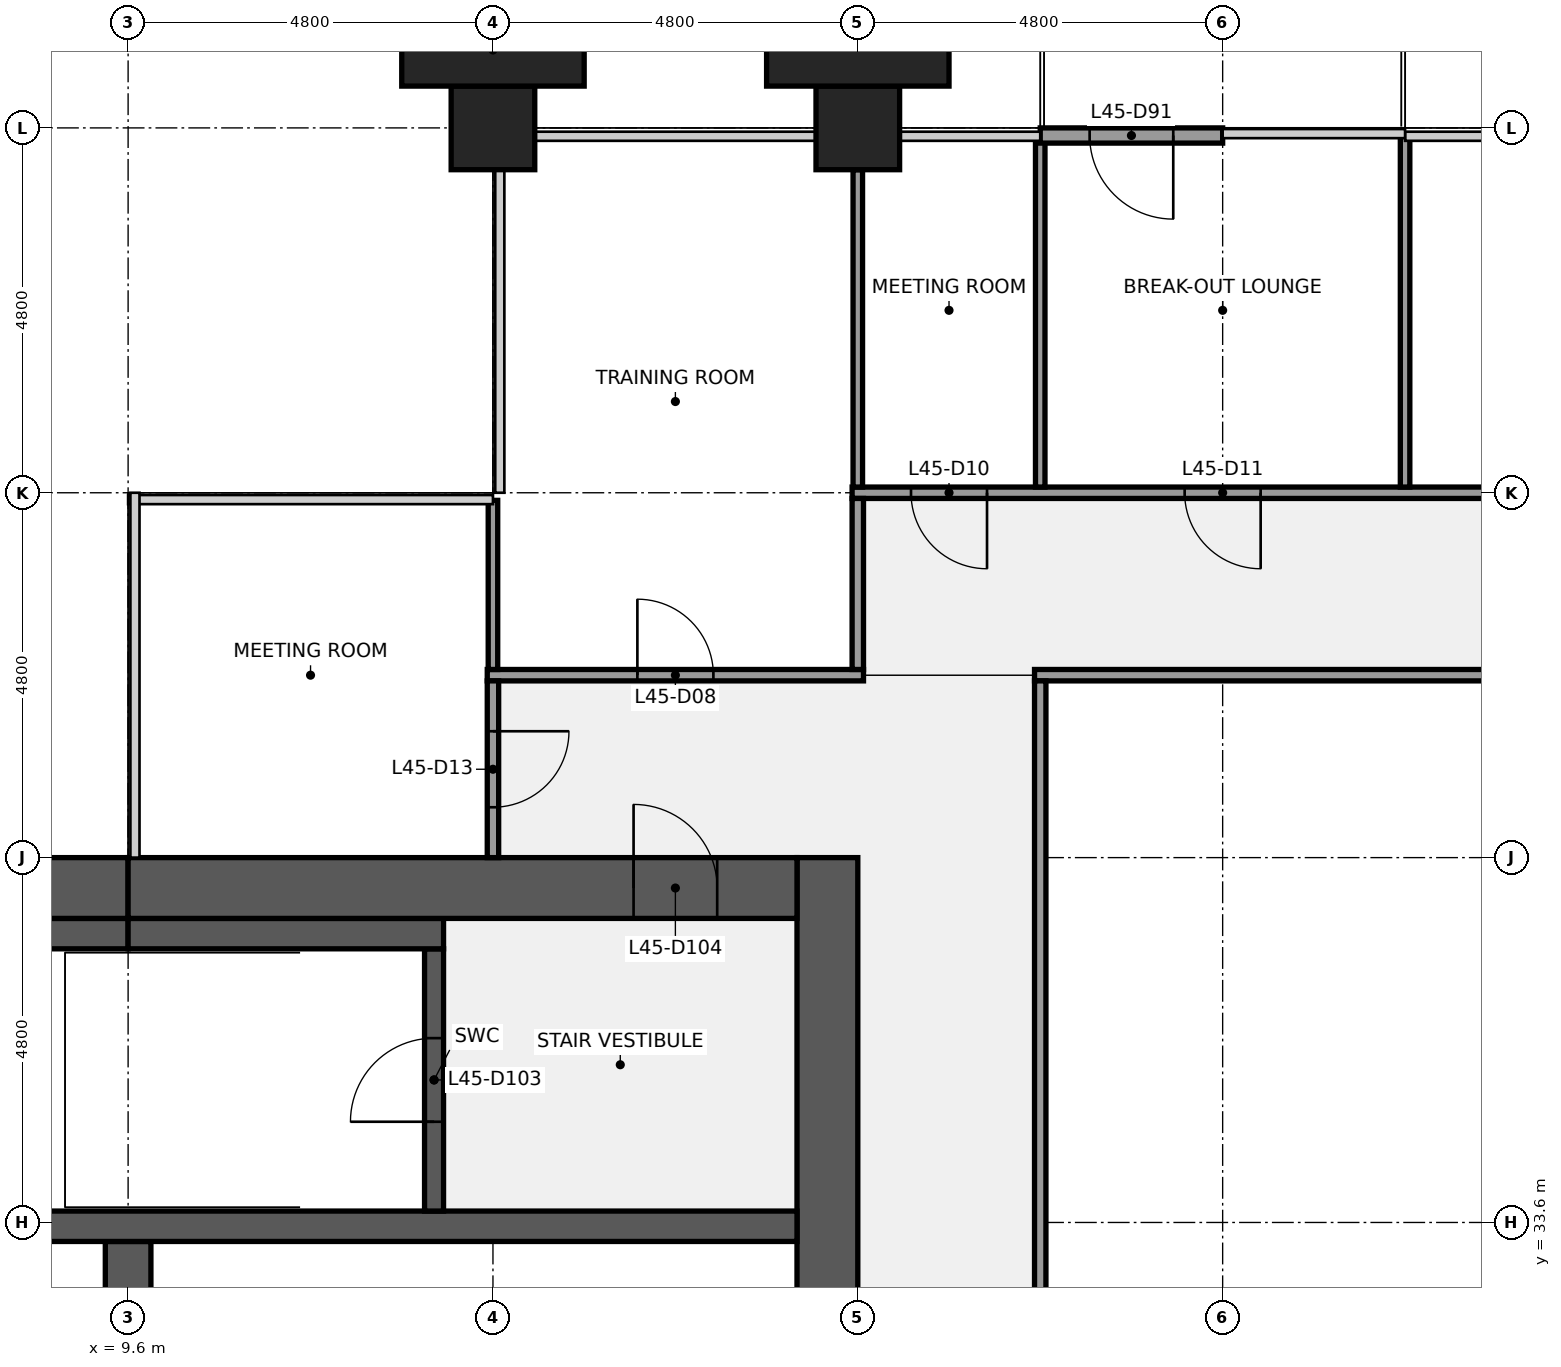
"""IFC4 building model, lengths in metres.
Left out: names, types, materials, properties, quantities, classifications, styles, units other than length and angle.
Written with IfcOpenShell. Run it as: python <this file> out.ifc"""

import sys

from ifc_helpers import new_model, si_unit, direction, frame, frame_2d, origin, origin_2d, place, context, subcontext, project, spatial, rectangle, extrude, element, fill, save


model = new_model("IFC4")
c1 = context("Model", 3, precision=1e-05, world=origin(), true_north=direction((0.0, 1.0)))
c2 = subcontext(c1, "Body", "Model", "MODEL_VIEW")
j1 = project(units=[si_unit("LENGTHUNIT", "METRE"), si_unit("PLANEANGLEUNIT", "RADIAN")], contexts=[c1])
p1 = place(None, origin())
s1 = spatial("IfcSite", under=j1, at=p1, CompositionType="ELEMENT")
p2 = place(p1, origin())
s2 = spatial("IfcBuilding", under=s1, at=p2, CompositionType="ELEMENT")
p3 = place(p2, frame((0.0, 0.0, 209.2)))
s3 = spatial("IfcBuildingStorey", under=s2, at=p3, CompositionType="ELEMENT", Elevation=209.2)
for number, where, z_axis, x_axis in (
    (1, (14.4, 48.0, 0.0), (0.0, 0.0, 1.0), (1.0, 0.0, 0.0)),
    (2, (19.2, 48.0, 0.0), (0.0, 0.0, 1.0), (1.0, 0.0, 0.0)),
):
    element("IfcColumn", number, at=place(p3, frame(where, z_axis=z_axis, x_axis=x_axis)), inside=s3, PredefinedType="COLUMN", context=c2, shape_type="SweptSolid", body=[
        extrude(rectangle(XDim=1.1, YDim=1.1, at=origin_2d()), origin(), (0.0, 0.0, 1.0), 4.0),
    ])
p4 = place(p3, frame((18.8, 38.4, 0.0), z_axis=(0.0, 0.0, 1.0), x_axis=(0.0, -1.0, 0.0)))
e3 = element("IfcWall", 3, at=p4, inside=s3, PredefinedType="SHEAR", context=c2, shape_type="SweptSolid", body=[
    extrude(rectangle(XDim=28.8, YDim=0.8, at=frame_2d((14.4, 0.0))), origin(), (0.0, 0.0, 1.0), 3.84),
])
p5 = place(p4, frame((18.3, 0.0, 0.0)))
e4 = element("IfcOpeningElement", 4, at=p5, cuts=e3, PredefinedType="OPENING", context=c2, shape_type="SweptSolid", body=[
    extrude(rectangle(XDim=1.8, YDim=2.1, at=frame_2d((0.9, 1.05))), frame((0.0, 0.41, 0.0), z_axis=(0.0, -1.0, 0.0), x_axis=(1.0, 0.0, 0.0)), (0.0, 0.0, 1.0), 0.82),
])
p6 = place(p4, frame((8.7, 0.0, 0.0)))
e5 = element("IfcOpeningElement", 5, at=p6, cuts=e3, PredefinedType="OPENING", context=c2, shape_type="SweptSolid", body=[
    extrude(rectangle(XDim=1.8, YDim=2.1, at=frame_2d((0.9, 1.05))), frame((0.0, 0.41, 0.0), z_axis=(0.0, -1.0, 0.0), x_axis=(1.0, 0.0, 0.0)), (0.0, 0.0, 1.0), 0.82),
])
p7 = place(p3, frame((9.6, 30.75, 0.0), z_axis=(0.0, 0.0, 1.0), x_axis=(0.0, 1.0, 0.0)))
e6 = element("IfcWall", 6, at=p7, inside=s3, PredefinedType="SHEAR", context=c2, shape_type="SweptSolid", body=[
    extrude(rectangle(XDim=2.6, YDim=0.6, at=frame_2d((1.3, 0.0))), origin(), (0.0, 0.0, 1.0), 3.84),
])
p8 = place(p3, frame((0.8, 33.55, 0.0), z_axis=(0.0, 0.0, 1.0), x_axis=(1.0, 0.0, 0.0)))
e7 = element("IfcWall", 7, at=p8, inside=s3, PredefinedType="SHEAR", context=c2, shape_type="SweptSolid", body=[
    extrude(rectangle(XDim=17.6, YDim=0.4, at=frame_2d((8.8, 0.0))), origin(), (0.0, 0.0, 1.0), 3.84),
])
p9 = place(p3, frame((13.625, 33.75, 0.0), z_axis=(0.0, 0.0, 1.0), x_axis=(0.0, 1.0, 0.0)))
e8 = element("IfcWall", 8, at=p9, inside=s3, PredefinedType="SHEAR", context=c2, shape_type="SweptSolid", body=[
    extrude(rectangle(XDim=3.45, YDim=0.25, at=frame_2d((1.725, 0.0))), origin(), (0.0, 0.0, 1.0), 3.84),
])
p10 = place(p9, frame((1.175, 0.0, 0.0)))
e9 = element("IfcOpeningElement", 9, at=p10, cuts=e8, PredefinedType="OPENING", context=c2, shape_type="SweptSolid", body=[
    extrude(rectangle(XDim=1.1, YDim=2.1, at=frame_2d((0.55, 1.05))), frame((0.0, 0.135, 0.0), z_axis=(0.0, -1.0, 0.0), x_axis=(1.0, 0.0, 0.0)), (0.0, 0.0, 1.0), 0.27),
])
p11 = place(p3, frame((6.25, 37.4, 0.0), z_axis=(0.0, 0.0, 1.0), x_axis=(1.0, 0.0, 0.0)))
e10 = element("IfcWall", 10, at=p11, inside=s3, PredefinedType="SHEAR", context=c2, shape_type="SweptSolid", body=[
    extrude(rectangle(XDim=3.35, YDim=0.4, at=frame_2d((1.675, 0.0))), origin(), (0.0, 0.0, 1.0), 3.84),
])
p12 = place(p3, frame((9.6, 37.4, 0.0), z_axis=(0.0, 0.0, 1.0), x_axis=(1.0, 0.0, 0.0)))
e11 = element("IfcWall", 11, at=p12, inside=s3, PredefinedType="SHEAR", context=c2, shape_type="SweptSolid", body=[
    extrude(rectangle(XDim=4.15, YDim=0.4, at=frame_2d((2.075, 0.0))), origin(), (0.0, 0.0, 1.0), 3.84),
])
p13 = place(p3, frame((0.8, 38.0, 0.0), z_axis=(0.0, 0.0, 1.0), x_axis=(1.0, 0.0, 0.0)))
e12 = element("IfcWall", 12, at=p13, inside=s3, PredefinedType="SHEAR", context=c2, shape_type="SweptSolid", body=[
    extrude(rectangle(XDim=8.8, YDim=0.8, at=frame_2d((4.4, 0.0))), origin(), (0.0, 0.0, 1.0), 3.84),
])
p14 = place(p13, frame((5.5, 0.0, 0.9)))
e13 = element("IfcOpeningElement", 13, at=p14, cuts=e12, PredefinedType="OPENING", context=c2, shape_type="SweptSolid", body=[
    extrude(rectangle(XDim=1.8, YDim=1.5, at=frame_2d((0.9, 0.75))), frame((0.0, 0.41, 0.0), z_axis=(0.0, -1.0, 0.0), x_axis=(1.0, 0.0, 0.0)), (0.0, 0.0, 1.0), 0.82),
])
p15 = place(p3, frame((9.6, 38.0, 0.0), z_axis=(0.0, 0.0, 1.0), x_axis=(1.0, 0.0, 0.0)))
e14 = element("IfcWall", 14, at=p15, inside=s3, PredefinedType="SHEAR", context=c2, shape_type="SweptSolid", body=[
    extrude(rectangle(XDim=8.8, YDim=0.8, at=frame_2d((4.4, 0.0))), origin(), (0.0, 0.0, 1.0), 3.84),
])
p16 = place(p15, frame((6.65, 0.0, 0.0)))
e15 = element("IfcOpeningElement", 15, at=p16, cuts=e14, PredefinedType="OPENING", context=c2, shape_type="SweptSolid", body=[
    extrude(rectangle(XDim=1.1, YDim=2.1, at=frame_2d((0.55, 1.05))), frame((0.0, 0.41, 0.0), z_axis=(0.0, -1.0, 0.0), x_axis=(1.0, 0.0, 0.0)), (0.0, 0.0, 1.0), 0.82),
])
p17 = place(p3, frame((14.325, 40.8, 0.0), z_axis=(0.0, 0.0, 1.0), x_axis=(1.0, 0.0, 0.0)))
e16 = element("IfcWall", 16, at=p17, inside=s3, PredefinedType="PARTITIONING", context=c2, shape_type="SweptSolid", body=[
    extrude(rectangle(XDim=4.95, YDim=0.15, at=frame_2d((2.475, 0.0))), origin(), (0.0, 0.0, 1.0), 2.87),
])
p18 = place(p17, frame((1.975, 0.0, 0.0)))
e17 = element("IfcOpeningElement", 17, at=p18, cuts=e16, PredefinedType="OPENING", context=c2, shape_type="SweptSolid", body=[
    extrude(rectangle(XDim=1.0, YDim=2.1, at=frame_2d((0.5, 1.05))), frame((0.0, 0.085, 0.0), z_axis=(0.0, -1.0, 0.0), x_axis=(1.0, 0.0, 0.0)), (0.0, 0.0, 1.0), 0.17),
])
p19 = place(p3, frame((21.525, 40.8, 0.0), z_axis=(0.0, 0.0, 1.0), x_axis=(1.0, 0.0, 0.0)))
e18 = element("IfcWall", 18, at=p19, inside=s3, PredefinedType="PARTITIONING", context=c2, shape_type="SweptSolid", body=[
    extrude(rectangle(XDim=14.55, YDim=0.15, at=frame_2d((7.275, 0.0))), origin(), (0.0, 0.0, 1.0), 2.87),
])
p20 = place(p3, frame((19.125, 43.2, 0.0), z_axis=(0.0, 0.0, 1.0), x_axis=(1.0, 0.0, 0.0)))
e19 = element("IfcWall", 19, at=p20, inside=s3, PredefinedType="PARTITIONING", context=c2, shape_type="SweptSolid", body=[
    extrude(rectangle(XDim=19.35, YDim=0.15, at=frame_2d((9.675, 0.0))), origin(), (0.0, 0.0, 1.0), 2.87),
])
p21 = place(p20, frame((0.775, 0.0, 0.0)))
e20 = element("IfcOpeningElement", 20, at=p21, cuts=e19, PredefinedType="OPENING", context=c2, shape_type="SweptSolid", body=[
    extrude(rectangle(XDim=1.0, YDim=2.1, at=frame_2d((0.5, 1.05))), frame((0.0, 0.085, 0.0), z_axis=(0.0, -1.0, 0.0), x_axis=(1.0, 0.0, 0.0)), (0.0, 0.0, 1.0), 0.17),
])
p22 = place(p20, frame((4.375, 0.0, 0.0)))
e21 = element("IfcOpeningElement", 21, at=p22, cuts=e19, PredefinedType="OPENING", context=c2, shape_type="SweptSolid", body=[
    extrude(rectangle(XDim=1.0, YDim=2.1, at=frame_2d((0.5, 1.05))), frame((0.0, 0.085, 0.0), z_axis=(0.0, -1.0, 0.0), x_axis=(1.0, 0.0, 0.0)), (0.0, 0.0, 1.0), 0.17),
])
p23 = place(p20, frame((12.775, 0.0, 0.0)))
e22 = element("IfcOpeningElement", 22, at=p23, cuts=e19, PredefinedType="OPENING", context=c2, shape_type="SweptSolid", body=[
    extrude(rectangle(XDim=1.0, YDim=2.1, at=frame_2d((0.5, 1.05))), frame((0.0, 0.085, 0.0), z_axis=(0.0, -1.0, 0.0), x_axis=(1.0, 0.0, 0.0)), (0.0, 0.0, 1.0), 0.17),
])
p24 = place(p3, frame((14.4, 40.875, 0.0), z_axis=(0.0, 0.0, 1.0), x_axis=(0.0, 1.0, 0.0)))
e23 = element("IfcWall", 23, at=p24, inside=s3, PredefinedType="PARTITIONING", context=c2, shape_type="SweptSolid", body=[
    extrude(rectangle(XDim=2.225, YDim=0.125, at=frame_2d((1.113, 0.0))), origin(), (0.0, 0.0, 1.0), 2.87),
])
p25 = place(p3, frame((14.4, 38.4, 0.0), z_axis=(0.0, 0.0, 1.0), x_axis=(0.0, 1.0, 0.0)))
e24 = element("IfcWall", 24, at=p25, inside=s3, PredefinedType="PARTITIONING", context=c2, shape_type="SweptSolid", body=[
    extrude(rectangle(XDim=2.325, YDim=0.15, at=frame_2d((1.163, 0.0))), origin(), (0.0, 0.0, 1.0), 2.87),
])
p26 = place(p25, frame((0.663, 0.0, 0.0)))
e25 = element("IfcOpeningElement", 25, at=p26, cuts=e24, PredefinedType="OPENING", context=c2, shape_type="SweptSolid", body=[
    extrude(rectangle(XDim=1.0, YDim=2.1, at=frame_2d((0.5, 1.05))), frame((0.0, 0.085, 0.0), z_axis=(0.0, -1.0, 0.0), x_axis=(1.0, 0.0, 0.0)), (0.0, 0.0, 1.0), 0.17),
])
p27 = place(p3, frame((19.2, 43.275, 0.0), z_axis=(0.0, 0.0, 1.0), x_axis=(0.0, 1.0, 0.0)))
e26 = element("IfcWall", 26, at=p27, inside=s3, PredefinedType="PARTITIONING", context=c2, shape_type="SweptSolid", body=[
    extrude(rectangle(XDim=4.175, YDim=0.125, at=frame_2d((2.087, 0.0))), origin(), (0.0, 0.0, 1.0), 2.87),
])
p28 = place(p3, frame((19.2, 40.875, 0.0), z_axis=(0.0, 0.0, 1.0), x_axis=(0.0, 1.0, 0.0)))
e27 = element("IfcWall", 27, at=p28, inside=s3, PredefinedType="PARTITIONING", context=c2, shape_type="SweptSolid", body=[
    extrude(rectangle(XDim=2.25, YDim=0.15, at=frame_2d((1.125, 0.0))), origin(), (0.0, 0.0, 1.0), 2.87),
])
p29 = place(p3, frame((21.6, 43.275, 0.0), z_axis=(0.0, 0.0, 1.0), x_axis=(0.0, 1.0, 0.0)))
e28 = element("IfcWall", 28, at=p29, inside=s3, PredefinedType="PARTITIONING", context=c2, shape_type="SweptSolid", body=[
    extrude(rectangle(XDim=4.625, YDim=0.125, at=frame_2d((2.312, 0.0))), origin(), (0.0, 0.0, 1.0), 2.87),
])
p30 = place(p3, frame((21.6, 21.663, 0.0), z_axis=(0.0, 0.0, 1.0), x_axis=(0.0, 1.0, 0.0)))
e29 = element("IfcWall", 29, at=p30, inside=s3, PredefinedType="PARTITIONING", context=c2, shape_type="SweptSolid", body=[
    extrude(rectangle(XDim=19.062, YDim=0.15, at=frame_2d((9.531, 0.0))), origin(), (0.0, 0.0, 1.0), 2.87),
])
p31 = place(p30, frame((9.031, 0.0, 0.0)))
e30 = element("IfcOpeningElement", 30, at=p31, cuts=e29, PredefinedType="OPENING", context=c2, shape_type="SweptSolid", body=[
    extrude(rectangle(XDim=1.0, YDim=2.1, at=frame_2d((0.5, 1.05))), frame((0.0, 0.085, 0.0), z_axis=(0.0, -1.0, 0.0), x_axis=(1.0, 0.0, 0.0)), (0.0, 0.0, 1.0), 0.17),
])
p32 = place(p3, frame((26.4, 43.275, 0.0), z_axis=(0.0, 0.0, 1.0), x_axis=(0.0, 1.0, 0.0)))
e31 = element("IfcWall", 31, at=p32, inside=s3, PredefinedType="PARTITIONING", context=c2, shape_type="SweptSolid", body=[
    extrude(rectangle(XDim=4.625, YDim=0.125, at=frame_2d((2.312, 0.0))), origin(), (0.0, 0.0, 1.0), 2.87),
])
p33 = place(p3, frame((24.0, 47.9, 0.0), z_axis=(0.0, 0.0, 1.0), x_axis=(-1.0, 0.0, 0.0)))
e32 = element("IfcWall", 32, at=p33, inside=s3, PredefinedType="SOLIDWALL", context=c2, shape_type="SweptSolid", body=[
    extrude(rectangle(XDim=2.4, YDim=0.2, at=frame_2d((1.2, 0.0))), origin(), (0.0, 0.0, 1.0), 3.314),
])
p34 = place(p33, frame((0.65, 0.0, 0.0)))
e33 = element("IfcOpeningElement", 33, at=p34, cuts=e32, PredefinedType="OPENING", context=c2, shape_type="SweptSolid", body=[
    extrude(rectangle(XDim=1.1, YDim=2.1, at=frame_2d((0.55, 1.05))), frame((0.0, 0.11, 0.0), z_axis=(0.0, -1.0, 0.0), x_axis=(1.0, 0.0, 0.0)), (0.0, 0.0, 1.0), 0.22),
])
for number, where, z_axis, x_axis in (
    (34, (14.4, 49.025, 0.0), (0.0, 0.0, 1.0), (1.0, 0.0, 0.0)),
    (35, (19.2, 49.025, 0.0), (0.0, 0.0, 1.0), (1.0, 0.0, 0.0)),
):
    element("IfcColumn", number, at=place(p3, frame(where, z_axis=z_axis, x_axis=x_axis)), inside=s3, PredefinedType="PILASTER", context=c2, shape_type="SweptSolid", body=[
        extrude(rectangle(XDim=2.4, YDim=0.95, at=origin_2d()), origin(), (0.0, 0.0, 1.0), 4.0),
    ])
p35 = place(p10, origin())
e36 = element("IfcDoor", 36, at=p35, inside=s3, OperationType="SINGLE_SWING_LEFT", PredefinedType="DOOR", context=c2, shape_type="SweptSolid", body=[
    extrude(rectangle(XDim=1.1, YDim=2.1, at=frame_2d((0.55, 1.05))), frame((0.0, 0.025, 0.0), z_axis=(0.0, -1.0, 0.0), x_axis=(1.0, 0.0, 0.0)), (0.0, 0.0, 1.0), 0.05),
])
fill(e9, e36)
p36 = place(p16, origin())
e37 = element("IfcDoor", 37, at=p36, inside=s3, OperationType="SINGLE_SWING_LEFT", PredefinedType="DOOR", context=c2, shape_type="SweptSolid", body=[
    extrude(rectangle(XDim=1.1, YDim=2.1, at=frame_2d((0.55, 1.05))), frame((0.0, 0.025, 0.0), z_axis=(0.0, -1.0, 0.0), x_axis=(1.0, 0.0, 0.0)), (0.0, 0.0, 1.0), 0.05),
])
fill(e15, e37)
p37 = place(p18, origin())
e38 = element("IfcDoor", 38, at=p37, inside=s3, OperationType="SINGLE_SWING_LEFT", PredefinedType="DOOR", context=c2, shape_type="SweptSolid", body=[
    extrude(rectangle(XDim=1.0, YDim=2.1, at=frame_2d((0.5, 1.05))), frame((0.0, 0.025, 0.0), z_axis=(0.0, -1.0, 0.0), x_axis=(1.0, 0.0, 0.0)), (0.0, 0.0, 1.0), 0.05),
])
fill(e17, e38)
p38 = place(p21, origin())
e39 = element("IfcDoor", 39, at=p38, inside=s3, OperationType="SINGLE_SWING_RIGHT", PredefinedType="DOOR", context=c2, shape_type="SweptSolid", body=[
    extrude(rectangle(XDim=1.0, YDim=2.1, at=frame_2d((0.5, 1.05))), frame((0.0, 0.025, 0.0), z_axis=(0.0, -1.0, 0.0), x_axis=(1.0, 0.0, 0.0)), (0.0, 0.0, 1.0), 0.05),
])
fill(e20, e39)
p39 = place(p22, origin())
e40 = element("IfcDoor", 40, at=p39, inside=s3, OperationType="SINGLE_SWING_RIGHT", PredefinedType="DOOR", context=c2, shape_type="SweptSolid", body=[
    extrude(rectangle(XDim=1.0, YDim=2.1, at=frame_2d((0.5, 1.05))), frame((0.0, 0.025, 0.0), z_axis=(0.0, -1.0, 0.0), x_axis=(1.0, 0.0, 0.0)), (0.0, 0.0, 1.0), 0.05),
])
fill(e21, e40)
p40 = place(p26, origin())
e41 = element("IfcDoor", 41, at=p40, inside=s3, OperationType="SINGLE_SWING_RIGHT", PredefinedType="DOOR", context=c2, shape_type="SweptSolid", body=[
    extrude(rectangle(XDim=1.0, YDim=2.1, at=frame_2d((0.5, 1.05))), frame((0.0, 0.025, 0.0), z_axis=(0.0, -1.0, 0.0), x_axis=(1.0, 0.0, 0.0)), (0.0, 0.0, 1.0), 0.05),
])
fill(e25, e41)
p41 = place(p34, origin())
e42 = element("IfcDoor", 42, at=p41, inside=s3, OperationType="SINGLE_SWING_LEFT", PredefinedType="DOOR", context=c2, shape_type="SweptSolid", body=[
    extrude(rectangle(XDim=1.1, YDim=2.1, at=frame_2d((0.55, 1.05))), frame((0.0, 0.025, 0.0), z_axis=(0.0, -1.0, 0.0), x_axis=(1.0, 0.0, 0.0)), (0.0, 0.0, 1.0), 0.05),
])
fill(e33, e42)
save(model, sys.argv[1])
